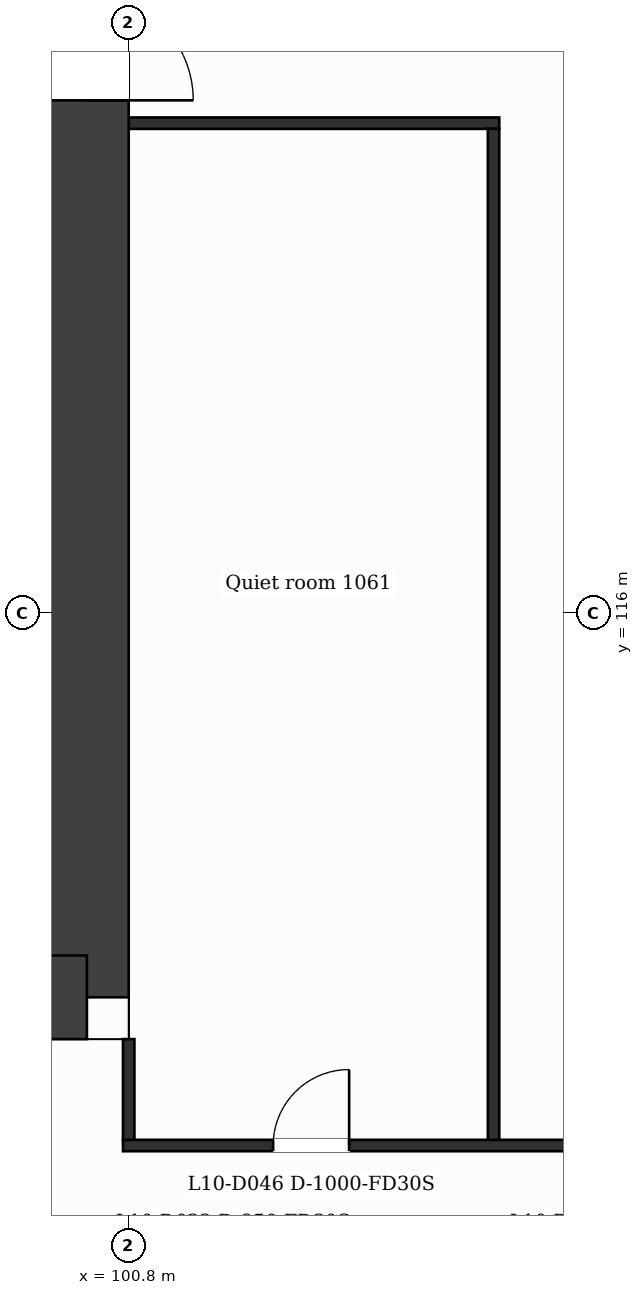
"""IFC4 building model, lengths in metres.
Left out: names, types, materials, properties, quantities, classifications, styles, units other than length and angle.
Written with IfcOpenShell. Run it as: python <this file> out.ifc"""

import sys

from ifc_helpers import new_model, si_unit, direction, frame, frame_2d, origin, place, context, subcontext, project, spatial, rectangle, extrude, element, fill, save


model = new_model("IFC4")
c1 = context("Model", 3, precision=1e-05, world=origin(), true_north=direction((0.0, 1.0)))
c2 = subcontext(c1, "Body", "Model", "MODEL_VIEW")
j1 = project(units=[si_unit("LENGTHUNIT", "METRE"), si_unit("PLANEANGLEUNIT", "RADIAN")], contexts=[c1])
p1 = place(None, origin())
s1 = spatial("IfcSite", under=j1, at=p1, CompositionType="ELEMENT")
p2 = place(p1, origin())
s2 = spatial("IfcBuilding", under=s1, at=p2, CompositionType="ELEMENT")
p3 = place(p2, frame((0.0, 0.0, 53.0)))
s3 = spatial("IfcBuildingStorey", under=s2, at=p3, CompositionType="ELEMENT", Elevation=53.0)
p4 = place(p3, frame((100.25, 131.85, 0.0), z_axis=(0.0, 0.0, 1.0), x_axis=(0.0, -1.0, 0.0)))
e1 = element("IfcWall", 1, at=p4, inside=s3, PredefinedType="SHEAR", context=c2, shape_type="SweptSolid", body=[
    extrude(rectangle(XDim=20.9, YDim=1.1, at=frame_2d((10.45, 0.0))), origin(), (0.0, 0.0, 1.0), 3.5),
])
p5 = place(p4, frame((7.7, 0.0, 0.0)))
e2 = element("IfcOpeningElement", 2, at=p5, cuts=e1, PredefinedType="OPENING", context=c2, shape_type="SweptSolid", body=[
    extrude(rectangle(XDim=1.4, YDim=2.1, at=frame_2d((0.7, 1.05))), frame((0.0, 0.56, 0.0), z_axis=(0.0, -1.0, 0.0), x_axis=(1.0, 0.0, 0.0)), (0.0, 0.0, 1.0), 1.12),
])
p6 = place(p3, frame((100.25, 110.95, 0.0), z_axis=(0.0, 0.0, 1.0), x_axis=(-1.0, 0.0, 0.0)))
e3 = element("IfcWall", 3, at=p6, inside=s3, PredefinedType="SHEAR", context=c2, shape_type="SweptSolid", body=[
    extrude(rectangle(XDim=13.952, YDim=1.1, at=frame_2d((6.976, 0.0))), origin(), (0.0, 0.0, 1.0), 3.5),
])
p7 = place(p6, frame((5.748, 0.0, 0.0)))
e4 = element("IfcOpeningElement", 4, at=p7, cuts=e3, PredefinedType="OPENING", context=c2, shape_type="SweptSolid", body=[
    extrude(rectangle(XDim=1.4, YDim=2.1, at=frame_2d((0.7, 1.05))), frame((0.0, 0.56, 0.0), z_axis=(0.0, -1.0, 0.0), x_axis=(1.0, 0.0, 0.0)), (0.0, 0.0, 1.0), 1.12),
])
p8 = place(p3, frame((100.725, 109.0, 0.0), z_axis=(0.0, 0.0, 1.0), x_axis=(1.0, 0.0, 0.0)))
e5 = element("IfcWall", 5, at=p8, inside=s3, PredefinedType="PARTITIONING", context=c2, shape_type="SweptSolid", body=[
    extrude(rectangle(XDim=25.35, YDim=0.15, at=frame_2d((12.675, 0.0))), origin(), (0.0, 0.0, 1.0), 3.18),
])
p9 = place(p8, frame((1.975, 0.0, 0.0)))
e6 = element("IfcOpeningElement", 6, at=p9, cuts=e5, PredefinedType="OPENING", context=c2, shape_type="SweptSolid", body=[
    extrude(rectangle(XDim=1.0, YDim=2.1, at=frame_2d((0.5, 1.05))), frame((0.0, 0.085, 0.0), z_axis=(0.0, -1.0, 0.0), x_axis=(1.0, 0.0, 0.0)), (0.0, 0.0, 1.0), 0.17),
])
p10 = place(p8, frame((11.505, 0.0, 0.0)))
e7 = element("IfcOpeningElement", 7, at=p10, cuts=e5, PredefinedType="OPENING", context=c2, shape_type="SweptSolid", body=[
    extrude(rectangle(XDim=1.0, YDim=2.1, at=frame_2d((0.5, 1.05))), frame((0.0, 0.085, 0.0), z_axis=(0.0, -1.0, 0.0), x_axis=(1.0, 0.0, 0.0)), (0.0, 0.0, 1.0), 0.17),
])
p11 = place(p8, frame((22.065, 0.0, 0.0)))
e8 = element("IfcOpeningElement", 8, at=p11, cuts=e5, PredefinedType="OPENING", context=c2, shape_type="SweptSolid", body=[
    extrude(rectangle(XDim=1.0, YDim=2.1, at=frame_2d((0.5, 1.05))), frame((0.0, 0.085, 0.0), z_axis=(0.0, -1.0, 0.0), x_axis=(1.0, 0.0, 0.0)), (0.0, 0.0, 1.0), 0.17),
])
p12 = place(p3, frame((100.8, 122.45, 0.0), z_axis=(0.0, 0.0, 1.0), x_axis=(1.0, 0.0, 0.0)))
e9 = element("IfcWall", 9, at=p12, inside=s3, PredefinedType="PARTITIONING", context=c2, shape_type="SweptSolid", body=[
    extrude(rectangle(XDim=4.875, YDim=0.15, at=frame_2d((2.438, 0.0))), origin(), (0.0, 0.0, 1.0), 3.18),
])
p13 = place(p3, frame((100.8, 109.075, 0.0), z_axis=(0.0, 0.0, 1.0), x_axis=(0.0, 1.0, 0.0)))
e10 = element("IfcWall", 10, at=p13, inside=s3, PredefinedType="PARTITIONING", context=c2, shape_type="SweptSolid", body=[
    extrude(rectangle(XDim=1.325, YDim=0.15, at=frame_2d((0.663, 0.0))), origin(), (0.0, 0.0, 1.0), 3.18),
])
p14 = place(p3, frame((105.6, 109.075, 0.0), z_axis=(0.0, 0.0, 1.0), x_axis=(0.0, 1.0, 0.0)))
e11 = element("IfcWall", 11, at=p14, inside=s3, PredefinedType="PARTITIONING", context=c2, shape_type="SweptSolid", body=[
    extrude(rectangle(XDim=13.3, YDim=0.15, at=frame_2d((6.65, 0.0))), origin(), (0.0, 0.0, 1.0), 3.18),
])
p15 = place(p9, origin())
e12 = element("IfcDoor", 12, at=p15, inside=s3, OperationType="SINGLE_SWING_RIGHT", PredefinedType="DOOR", context=c2, shape_type="SweptSolid", body=[
    extrude(rectangle(XDim=1.0, YDim=2.1, at=frame_2d((0.5, 1.05))), frame((0.0, 0.025, 0.0), z_axis=(0.0, -1.0, 0.0), x_axis=(1.0, 0.0, 0.0)), (0.0, 0.0, 1.0), 0.05),
])
fill(e6, e12)
p16 = place(p5, origin())
e13 = element("IfcDoor", 13, at=p16, inside=s3, OperationType="SINGLE_SWING_RIGHT", PredefinedType="DOOR", context=c2, shape_type="SweptSolid", body=[
    extrude(rectangle(XDim=1.4, YDim=2.1, at=frame_2d((0.7, 1.05))), frame((0.0, 0.025, 0.0), z_axis=(0.0, -1.0, 0.0), x_axis=(1.0, 0.0, 0.0)), (0.0, 0.0, 1.0), 0.05),
])
fill(e2, e13)
save(model, sys.argv[1])
